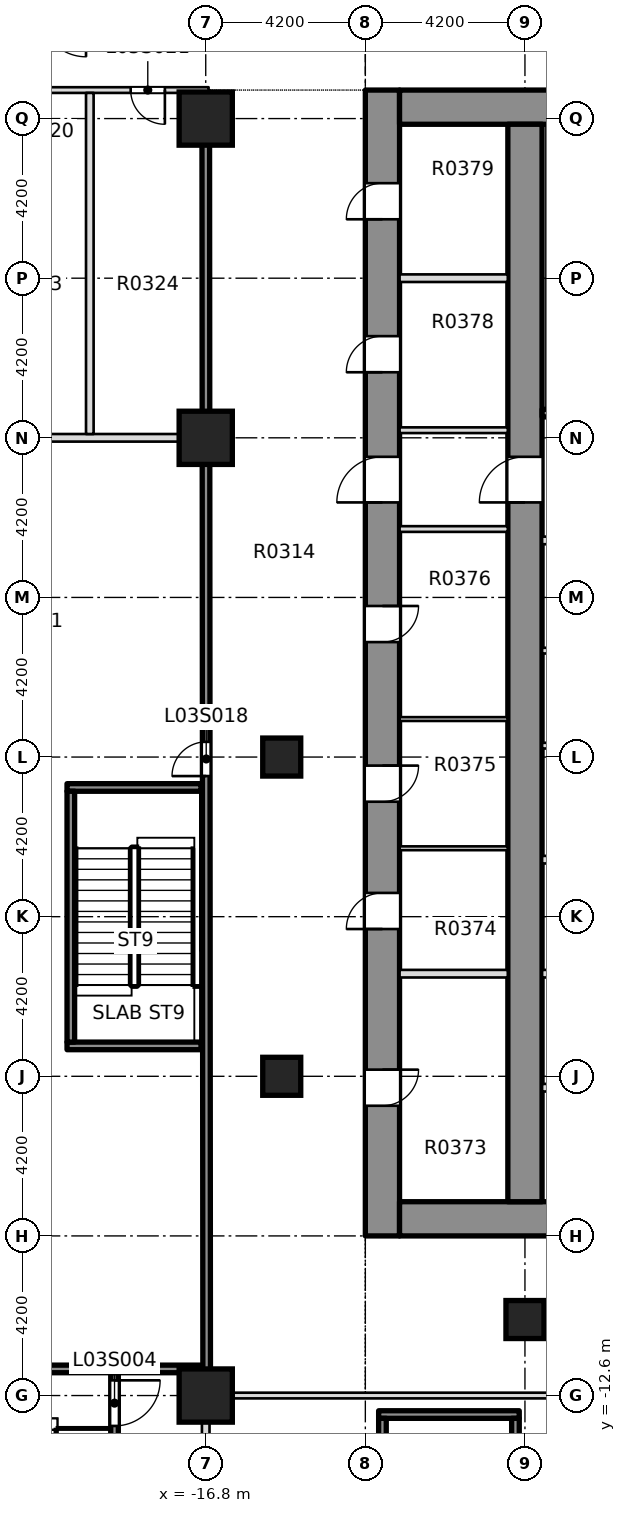
"""IFC4 building model, lengths in metres.
Left out: names, types, materials, properties, quantities, classifications, styles, units other than length and angle.
Written with IfcOpenShell. Run it as: python <this file> out.ifc"""

import sys

from ifc_helpers import new_model, si_unit, direction, frame, frame_2d, origin, origin_2d, place, context, subcontext, project, spatial, rectangle, extrude, element, fill, save


model = new_model("IFC4")
c1 = context("Model", 3, precision=1e-05, world=origin(), true_north=direction((0.0, 1.0)))
c2 = subcontext(c1, "Body", "Model", "MODEL_VIEW")
j1 = project(units=[si_unit("LENGTHUNIT", "METRE"), si_unit("PLANEANGLEUNIT", "RADIAN")], contexts=[c1])
p1 = place(None, origin())
s1 = spatial("IfcSite", under=j1, at=p1, CompositionType="ELEMENT")
p2 = place(p1, origin())
s2 = spatial("IfcBuilding", under=s1, at=p2, CompositionType="ELEMENT")
p3 = place(p2, frame((0.0, 0.0, 20.0)))
s3 = spatial("IfcBuildingStorey", under=s2, at=p3, CompositionType="ELEMENT", Elevation=20.0)
p4 = place(p3, frame((-12.15, -8.4, -0.4), z_axis=(0.0, 0.0, 1.0), x_axis=(0.0, 1.0, 0.0)))
e1 = element("IfcWall", 1, at=p4, inside=s3, PredefinedType="SHEAR", context=c2, shape_type="SweptSolid", body=[
    extrude(rectangle(XDim=30.15, YDim=0.9, at=frame_2d((15.075, 0.0))), origin(), (0.0, 0.0, 1.0), 5.0),
])
p5 = place(p4, frame((3.425, 0.0, 0.4)))
e2 = element("IfcOpeningElement", 2, at=p5, cuts=e1, PredefinedType="OPENING", context=c2, shape_type="SweptSolid", body=[
    extrude(rectangle(XDim=0.95, YDim=2.1, at=frame_2d((0.475, 1.05))), frame((0.0, 0.46, 0.0), z_axis=(0.0, -1.0, 0.0), x_axis=(1.0, 0.0, 0.0)), (0.0, 0.0, 1.0), 0.92),
])
p6 = place(p4, frame((8.075, 0.0, 0.4)))
e3 = element("IfcOpeningElement", 3, at=p6, cuts=e1, PredefinedType="OPENING", context=c2, shape_type="SweptSolid", body=[
    extrude(rectangle(XDim=0.95, YDim=2.1, at=frame_2d((0.475, 1.05))), frame((0.0, 0.46, 0.0), z_axis=(0.0, -1.0, 0.0), x_axis=(1.0, 0.0, 0.0)), (0.0, 0.0, 1.0), 0.92),
])
p7 = place(p4, frame((11.425, 0.0, 0.4)))
e4 = element("IfcOpeningElement", 4, at=p7, cuts=e1, PredefinedType="OPENING", context=c2, shape_type="SweptSolid", body=[
    extrude(rectangle(XDim=0.95, YDim=2.1, at=frame_2d((0.475, 1.05))), frame((0.0, 0.46, 0.0), z_axis=(0.0, -1.0, 0.0), x_axis=(1.0, 0.0, 0.0)), (0.0, 0.0, 1.0), 0.92),
])
p8 = place(p4, frame((15.625, 0.0, 0.4)))
e5 = element("IfcOpeningElement", 5, at=p8, cuts=e1, PredefinedType="OPENING", context=c2, shape_type="SweptSolid", body=[
    extrude(rectangle(XDim=0.95, YDim=2.1, at=frame_2d((0.475, 1.05))), frame((0.0, 0.46, 0.0), z_axis=(0.0, -1.0, 0.0), x_axis=(1.0, 0.0, 0.0)), (0.0, 0.0, 1.0), 0.92),
])
p9 = place(p4, frame((22.725, 0.0, 0.4)))
e6 = element("IfcOpeningElement", 6, at=p9, cuts=e1, PredefinedType="OPENING", context=c2, shape_type="SweptSolid", body=[
    extrude(rectangle(XDim=0.95, YDim=2.1, at=frame_2d((0.475, 1.05))), frame((0.0, 0.46, 0.0), z_axis=(0.0, -1.0, 0.0), x_axis=(1.0, 0.0, 0.0)), (0.0, 0.0, 1.0), 0.92),
])
p10 = place(p4, frame((26.75, 0.0, 0.4)))
e7 = element("IfcOpeningElement", 7, at=p10, cuts=e1, PredefinedType="OPENING", context=c2, shape_type="SweptSolid", body=[
    extrude(rectangle(XDim=0.95, YDim=2.1, at=frame_2d((0.475, 1.05))), frame((0.0, 0.46, 0.0), z_axis=(0.0, -1.0, 0.0), x_axis=(1.0, 0.0, 0.0)), (0.0, 0.0, 1.0), 0.92),
])
p11 = place(p4, frame((19.3, 0.0, 0.4)))
e8 = element("IfcOpeningElement", 8, at=p11, cuts=e1, PredefinedType="OPENING", context=c2, shape_type="SweptSolid", body=[
    extrude(rectangle(XDim=1.2, YDim=2.1, at=frame_2d((0.6, 1.05))), frame((0.0, 0.46, 0.0), z_axis=(0.0, -1.0, 0.0), x_axis=(1.0, 0.0, 0.0)), (0.0, 0.0, 1.0), 0.92),
])
p12 = place(p3, frame((-11.7, -7.95, -0.4), z_axis=(0.0, 0.0, 1.0), x_axis=(1.0, 0.0, 0.0)))
e9 = element("IfcWall", 9, at=p12, inside=s3, PredefinedType="SHEAR", context=c2, shape_type="SweptSolid", body=[
    extrude(rectangle(XDim=23.4, YDim=0.9, at=frame_2d((11.7, 0.0))), origin(), (0.0, 0.0, 1.0), 5.0),
])
p13 = place(p12, frame((6.95, 0.0, 0.4)))
e10 = element("IfcOpeningElement", 10, at=p13, cuts=e9, PredefinedType="OPENING", context=c2, shape_type="SweptSolid", body=[
    extrude(rectangle(XDim=1.8, YDim=2.1, at=frame_2d((0.9, 1.05))), frame((0.0, 0.46, 0.0), z_axis=(0.0, -1.0, 0.0), x_axis=(1.0, 0.0, 0.0)), (0.0, 0.0, 1.0), 0.92),
])
p14 = place(p12, frame((14.65, 0.0, 0.4)))
e11 = element("IfcOpeningElement", 11, at=p14, cuts=e9, PredefinedType="OPENING", context=c2, shape_type="SweptSolid", body=[
    extrude(rectangle(XDim=1.8, YDim=2.1, at=frame_2d((0.9, 1.05))), frame((0.0, 0.46, 0.0), z_axis=(0.0, -1.0, 0.0), x_axis=(1.0, 0.0, 0.0)), (0.0, 0.0, 1.0), 0.92),
])
p15 = place(p3, frame((-11.7, 21.3, -0.4), z_axis=(0.0, 0.0, 1.0), x_axis=(1.0, 0.0, 0.0)))
e12 = element("IfcWall", 12, at=p15, inside=s3, PredefinedType="SOLIDWALL", context=c2, shape_type="SweptSolid", body=[
    extrude(rectangle(XDim=23.4, YDim=0.9, at=frame_2d((11.7, 0.0))), origin(), (0.0, 0.0, 1.0), 5.0),
])
p16 = place(p3, frame((-8.4, -7.5, -0.4), z_axis=(0.0, 0.0, 1.0), x_axis=(0.0, 1.0, 0.0)))
e13 = element("IfcWall", 13, at=p16, inside=s3, PredefinedType="SHEAR", context=c2, shape_type="SweptSolid", body=[
    extrude(rectangle(XDim=28.35, YDim=0.9, at=frame_2d((14.175, 0.0))), origin(), (0.0, 0.0, 1.0), 5.0),
])
p17 = place(p16, frame((18.4, 0.0, 0.4)))
e14 = element("IfcOpeningElement", 14, at=p17, cuts=e13, PredefinedType="OPENING", context=c2, shape_type="SweptSolid", body=[
    extrude(rectangle(XDim=1.2, YDim=2.1, at=frame_2d((0.6, 1.05))), frame((0.0, 0.46, 0.0), z_axis=(0.0, -1.0, 0.0), x_axis=(1.0, 0.0, 0.0)), (0.0, 0.0, 1.0), 0.92),
])
for number, where, z_axis, x_axis in (
    (15, (-16.8, -12.6, -0.4), (0.0, 0.0, 1.0), (1.0, 0.0, 0.0)),
    (16, (-16.8, 12.6, -0.4), (0.0, 0.0, 1.0), (1.0, 0.0, 0.0)),
    (17, (-16.8, 21.0, -0.4), (0.0, 0.0, 1.0), (1.0, 0.0, 0.0)),
):
    element("IfcColumn", number, at=place(p3, frame(where, z_axis=z_axis, x_axis=x_axis)), inside=s3, PredefinedType="COLUMN", context=c2, shape_type="SweptSolid", body=[
        extrude(rectangle(XDim=1.4, YDim=1.4, at=origin_2d()), origin(), (0.0, 0.0, 1.0), 5.0),
    ])
for number, where, z_axis, x_axis in (
    (18, (-8.4, -10.6, -0.4), (0.0, 0.0, 1.0), (1.0, 0.0, 0.0)),
    (19, (-14.8, -4.2, -0.4), (0.0, 0.0, 1.0), (1.0, 0.0, 0.0)),
    (20, (-14.8, 4.2, -0.4), (0.0, 0.0, 1.0), (1.0, 0.0, 0.0)),
):
    element("IfcColumn", number, at=place(p3, frame(where, z_axis=z_axis, x_axis=x_axis)), inside=s3, PredefinedType="COLUMN", context=c2, shape_type="SweptSolid", body=[
        extrude(rectangle(XDim=1.0, YDim=1.0, at=origin_2d()), origin(), (0.0, 0.0, 1.0), 5.0),
    ])
p18 = place(p3, frame((-16.9, -12.6, 0.0), z_axis=(0.0, 0.0, 1.0), x_axis=(1.0, 0.0, 0.0)))
e21 = element("IfcWall", 21, at=p18, inside=s3, PredefinedType="PARTITIONING", context=c2, shape_type="SweptSolid", body=[
    extrude(rectangle(XDim=9.625, YDim=0.15, at=frame_2d((4.812, 0.0))), origin(), (0.0, 0.0, 1.0), 4.6),
])
p19 = place(p3, frame((-25.2, -11.9, 0.0), z_axis=(0.0, 0.0, 1.0), x_axis=(1.0, 0.0, 0.0)))
e22 = element("IfcWall", 22, at=p19, inside=s3, PredefinedType="SOLIDWALL", context=c2, shape_type="SweptSolid", body=[
    extrude(rectangle(XDim=8.325, YDim=0.2, at=frame_2d((4.163, 0.0))), origin(), (0.0, 0.0, 1.0), 4.6),
])
p20 = place(p3, frame((-25.75, 12.6, 0.0), z_axis=(0.0, 0.0, 1.0), x_axis=(1.0, 0.0, 0.0)))
e23 = element("IfcWall", 23, at=p20, inside=s3, PredefinedType="PARTITIONING", context=c2, shape_type="SweptSolid", body=[
    extrude(rectangle(XDim=8.875, YDim=0.2, at=frame_2d((4.438, 0.0))), origin(), (0.0, 0.0, 1.0), 4.6),
])
p21 = place(p3, frame((-25.75, 21.75, 0.0), z_axis=(0.0, 0.0, 1.0), x_axis=(1.0, 0.0, 0.0)))
e24 = element("IfcWall", 24, at=p21, inside=s3, PredefinedType="PARTITIONING", context=c2, shape_type="SweptSolid", body=[
    extrude(rectangle(XDim=9.025, YDim=0.15, at=frame_2d((4.512, 0.0))), origin(), (0.0, 0.0, 1.0), 4.6),
])
p22 = place(p21, frame((1.225, 0.0, 0.0)))
e25 = element("IfcOpeningElement", 25, at=p22, cuts=e24, PredefinedType="OPENING", context=c2, shape_type="SweptSolid", body=[
    extrude(rectangle(XDim=0.9, YDim=2.1, at=frame_2d((0.45, 1.05))), frame((0.0, 0.085, 0.0), z_axis=(0.0, -1.0, 0.0), x_axis=(1.0, 0.0, 0.0)), (0.0, 0.0, 1.0), 0.17),
])
p23 = place(p21, frame((3.925, 0.0, 0.0)))
e26 = element("IfcOpeningElement", 26, at=p23, cuts=e24, PredefinedType="OPENING", context=c2, shape_type="SweptSolid", body=[
    extrude(rectangle(XDim=0.9, YDim=2.1, at=frame_2d((0.45, 1.05))), frame((0.0, 0.085, 0.0), z_axis=(0.0, -1.0, 0.0), x_axis=(1.0, 0.0, 0.0)), (0.0, 0.0, 1.0), 0.17),
])
p24 = place(p21, frame((6.975, 0.0, 0.0)))
e27 = element("IfcOpeningElement", 27, at=p24, cuts=e24, PredefinedType="OPENING", context=c2, shape_type="SweptSolid", body=[
    extrude(rectangle(XDim=0.9, YDim=2.1, at=frame_2d((0.45, 1.05))), frame((0.0, 0.085, 0.0), z_axis=(0.0, -1.0, 0.0), x_axis=(1.0, 0.0, 0.0)), (0.0, 0.0, 1.0), 0.17),
])
p25 = place(p3, frame((-19.85, 12.7, 0.0), z_axis=(0.0, 0.0, 1.0), x_axis=(0.0, 1.0, 0.0)))
e28 = element("IfcWall", 28, at=p25, inside=s3, PredefinedType="PARTITIONING", context=c2, shape_type="SweptSolid", body=[
    extrude(rectangle(XDim=8.975, YDim=0.2, at=frame_2d((4.488, 0.0))), origin(), (0.0, 0.0, 1.0), 4.6),
])
p26 = place(p3, frame((-19.2, -18.125, 0.0), z_axis=(0.0, 0.0, 1.0), x_axis=(0.0, 1.0, 0.0)))
e29 = element("IfcWall", 29, at=p26, inside=s3, PredefinedType="SOLIDWALL", context=c2, shape_type="SweptSolid", body=[
    extrude(rectangle(XDim=6.125, YDim=0.2, at=frame_2d((3.062, 0.0))), origin(), (0.0, 0.0, 1.0), 4.6),
])
p27 = place(p26, frame((4.725, 0.0, 0.0)))
e30 = element("IfcOpeningElement", 30, at=p27, cuts=e29, PredefinedType="OPENING", context=c2, shape_type="SweptSolid", body=[
    extrude(rectangle(XDim=1.2, YDim=2.1, at=frame_2d((0.6, 1.05))), frame((0.0, 0.11, 0.0), z_axis=(0.0, -1.0, 0.0), x_axis=(1.0, 0.0, 0.0)), (0.0, 0.0, 1.0), 0.22),
])
p28 = place(p3, frame((-16.8, -18.125, 0.0), z_axis=(0.0, 0.0, 1.0), x_axis=(0.0, 1.0, 0.0)))
e31 = element("IfcWall", 31, at=p28, inside=s3, PredefinedType="PARTITIONING", context=c2, shape_type="SweptSolid", body=[
    extrude(rectangle(XDim=5.45, YDim=0.2, at=frame_2d((2.725, 0.0))), origin(), (0.0, 0.0, 1.0), 4.6),
])
p29 = place(p3, frame((-16.775, -12.525, 0.0), z_axis=(0.0, 0.0, 1.0), x_axis=(-0.000727609751, 0.999999735292, 0.0)))
e32 = element("IfcWall", 32, at=p29, inside=s3, PredefinedType="SOLIDWALL", context=c2, shape_type="SweptSolid", body=[
    extrude(rectangle(XDim=34.225, YDim=0.2, at=frame_2d((17.112, 0.0))), origin(), (0.0, 0.0, 1.0), 4.6),
])
p30 = place(p29, frame((16.225, 0.0, 0.0)))
e33 = element("IfcOpeningElement", 33, at=p30, cuts=e32, PredefinedType="OPENING", context=c2, shape_type="SweptSolid", body=[
    extrude(rectangle(XDim=0.9, YDim=2.1, at=frame_2d((0.45, 1.05))), frame((0.0, 0.11, 0.0), z_axis=(0.0, -1.0, 0.0), x_axis=(1.0, 0.0, 0.0)), (0.0, 0.0, 1.0), 0.22),
])
for number, where, z_axis, x_axis in (
    (34, (-7.949, -4.5, 0.0), (0.0, 0.0, 1.0), (1.0, 0.0, 0.0)),
    (35, (-7.949, -1.5, 0.0), (0.0, 0.0, 1.0), (1.0, 0.0, 0.0)),
    (36, (-7.949, 1.5, 0.0), (0.0, 0.0, 1.0), (1.0, 0.0, 0.0)),
):
    element("IfcWall", number, at=place(p3, frame(where, z_axis=z_axis, x_axis=x_axis)), inside=s3, PredefinedType="PARTITIONING", context=c2, shape_type="SweptSolid", body=[
        extrude(rectangle(XDim=2.374, YDim=0.2, at=frame_2d((1.187, 0.0))), origin(), (0.0, 0.0, 1.0), 4.6),
    ])
p31 = place(p3, frame((-7.949, 4.5, 0.0), z_axis=(0.0, 0.0, 1.0), x_axis=(1.0, 0.0, 0.0)))
e37 = element("IfcWall", 37, at=p31, inside=s3, PredefinedType="PARTITIONING", context=c2, shape_type="SweptSolid", body=[
    extrude(rectangle(XDim=2.524, YDim=0.15, at=frame_2d((1.262, 0.0))), origin(), (0.0, 0.0, 1.0), 4.6),
])
p32 = place(p3, frame((-7.949, 7.0, 0.0), z_axis=(0.0, 0.0, 1.0), x_axis=(1.0, 0.0, 0.0)))
e38 = element("IfcWall", 38, at=p32, inside=s3, PredefinedType="PARTITIONING", context=c2, shape_type="SweptSolid", body=[
    extrude(rectangle(XDim=15.898, YDim=0.15, at=frame_2d((7.949, 0.0))), origin(), (0.0, 0.0, 1.0), 4.6),
])
p33 = place(p32, frame((7.249, 0.0, 0.0)))
e39 = element("IfcOpeningElement", 39, at=p33, cuts=e38, PredefinedType="OPENING", context=c2, shape_type="SweptSolid", body=[
    extrude(rectangle(XDim=1.4, YDim=2.1, at=frame_2d((0.7, 1.05))), frame((0.0, 0.085, 0.0), z_axis=(0.0, -1.0, 0.0), x_axis=(1.0, 0.0, 0.0)), (0.0, 0.0, 1.0), 0.17),
])
p34 = place(p3, frame((-7.949, 9.9, 0.0), z_axis=(0.0, 0.0, 1.0), x_axis=(1.0, 0.0, 0.0)))
e40 = element("IfcWall", 40, at=p34, inside=s3, PredefinedType="PARTITIONING", context=c2, shape_type="SweptSolid", body=[
    extrude(rectangle(XDim=4.349, YDim=0.2, at=frame_2d((2.174, 0.0))), origin(), (0.0, 0.0, 1.0), 4.6),
])
p35 = place(p34, frame((0.999, 0.0, 0.0)))
e41 = element("IfcOpeningElement", 41, at=p35, cuts=e40, PredefinedType="OPENING", context=c2, shape_type="SweptSolid", body=[
    extrude(rectangle(XDim=1.1, YDim=2.1, at=frame_2d((0.55, 1.05))), frame((0.0, 0.11, 0.0), z_axis=(0.0, -1.0, 0.0), x_axis=(1.0, 0.0, 0.0)), (0.0, 0.0, 1.0), 0.22),
])
p36 = place(p3, frame((-7.949, 13.25, 0.0), z_axis=(0.0, 0.0, 1.0), x_axis=(1.0, 0.0, 0.0)))
e42 = element("IfcWall", 42, at=p36, inside=s3, PredefinedType="SOLIDWALL", context=c2, shape_type="SweptSolid", body=[
    extrude(rectangle(XDim=4.524, YDim=0.2, at=frame_2d((2.262, 0.0))), origin(), (0.0, 0.0, 1.0), 4.6),
])
p37 = place(p36, frame((1.499, 0.0, 0.0)))
e43 = element("IfcOpeningElement", 43, at=p37, cuts=e42, PredefinedType="OPENING", context=c2, shape_type="SweptSolid", body=[
    extrude(rectangle(XDim=1.2, YDim=2.1, at=frame_2d((0.6, 1.05))), frame((0.0, 0.11, 0.0), z_axis=(0.0, -1.0, 0.0), x_axis=(1.0, 0.0, 0.0)), (0.0, 0.0, 1.0), 0.22),
])
p38 = place(p3, frame((-11.699, -1.5, 0.0), z_axis=(0.0, 0.0, 1.0), x_axis=(1.0, 0.0, 0.0)))
e44 = element("IfcWall", 44, at=p38, inside=s3, PredefinedType="PARTITIONING", context=c2, shape_type="SweptSolid", body=[
    extrude(rectangle(XDim=2.848, YDim=0.2, at=frame_2d((1.424, 0.0))), origin(), (0.0, 0.0, 1.0), 4.6),
])
for number, where, z_axis, x_axis in (
    (45, (-11.699, 1.8, 0.0), (0.0, 0.0, 1.0), (1.0, 0.0, 0.0)),
    (46, (-11.699, 5.2, 0.0), (0.0, 0.0, 1.0), (1.0, 0.0, 0.0)),
):
    element("IfcWall", number, at=place(p3, frame(where, z_axis=z_axis, x_axis=x_axis)), inside=s3, PredefinedType="PARTITIONING", context=c2, shape_type="SweptSolid", body=[
        extrude(rectangle(XDim=2.848, YDim=0.1, at=frame_2d((1.424, 0.0))), origin(), (0.0, 0.0, 1.0), 4.6),
    ])
for number, where, z_axis, x_axis in (
    (47, (-11.699, 10.2, 0.0), (0.0, 0.0, 1.0), (1.0, 0.0, 0.0)),
    (48, (-11.699, 12.8, 0.0), (0.0, 0.0, 1.0), (1.0, 0.0, 0.0)),
):
    element("IfcWall", number, at=place(p3, frame(where, z_axis=z_axis, x_axis=x_axis)), inside=s3, PredefinedType="PARTITIONING", context=c2, shape_type="SweptSolid", body=[
        extrude(rectangle(XDim=2.848, YDim=0.15, at=frame_2d((1.424, 0.0))), origin(), (0.0, 0.0, 1.0), 4.6),
    ])
p39 = place(p3, frame((-11.699, 16.8, 0.0), z_axis=(0.0, 0.0, 1.0), x_axis=(1.0, 0.0, 0.0)))
e49 = element("IfcWall", 49, at=p39, inside=s3, PredefinedType="PARTITIONING", context=c2, shape_type="SweptSolid", body=[
    extrude(rectangle(XDim=2.848, YDim=0.2, at=frame_2d((1.424, 0.0))), origin(), (0.0, 0.0, 1.0), 4.6),
])
p40 = place(p3, frame((-12.25, -13.1, 0.0), z_axis=(0.0, 0.0, 1.0), x_axis=(1.0, 0.0, 0.0)))
e50 = element("IfcWall", 50, at=p40, inside=s3, PredefinedType="SOLIDWALL", context=c2, shape_type="SweptSolid", body=[
    extrude(rectangle(XDim=3.7, YDim=0.2, at=frame_2d((1.85, 0.0))), origin(), (0.0, 0.0, 1.0), 4.6),
])
p41 = place(p3, frame((-12.15, -19.8, 0.0), z_axis=(0.0, 0.0, 1.0), x_axis=(0.0, 1.0, 0.0)))
e51 = element("IfcWall", 51, at=p41, inside=s3, PredefinedType="SOLIDWALL", context=c2, shape_type="SweptSolid", body=[
    extrude(rectangle(XDim=6.6, YDim=0.2, at=frame_2d((3.3, 0.0))), origin(), (0.0, 0.0, 1.0), 4.6),
])
p42 = place(p3, frame((-8.65, -20.3, 0.0), z_axis=(0.0, 0.0, 1.0), x_axis=(0.0, 1.0, 0.0)))
e52 = element("IfcWall", 52, at=p42, inside=s3, PredefinedType="SOLIDWALL", context=c2, shape_type="SweptSolid", body=[
    extrude(rectangle(XDim=7.1, YDim=0.2, at=frame_2d((3.55, 0.0))), origin(), (0.0, 0.0, 1.0), 4.6),
])
for number, where, z_axis, x_axis in (
    (53, (-20.45, -3.4, 0.0), (0.0, 0.0, 1.0), (1.0, 0.0, 0.0)),
    (54, (-20.45, 3.4, 0.0), (0.0, 0.0, 1.0), (1.0, 0.0, 0.0)),
):
    element("IfcWall", number, at=place(p3, frame(where, z_axis=z_axis, x_axis=x_axis)), inside=s3, PredefinedType="SOLIDWALL", context=c2, shape_type="SweptSolid", body=[
        extrude(rectangle(XDim=3.525, YDim=0.2, at=frame_2d((1.762, 0.0))), origin(), (0.0, 0.0, 1.0), 4.6),
    ])
p43 = place(p3, frame((-20.35, -3.3, 0.0), z_axis=(0.0, 0.0, 1.0), x_axis=(0.0, 1.0, 0.0)))
e55 = element("IfcWall", 55, at=p43, inside=s3, PredefinedType="SOLIDWALL", context=c2, shape_type="SweptSolid", body=[
    extrude(rectangle(XDim=6.6, YDim=0.2, at=frame_2d((3.3, 0.0))), origin(), (0.0, 0.0, 1.0), 4.6),
])
p44 = place(p27, origin())
e56 = element("IfcDoor", 56, at=p44, inside=s3, OperationType="DOUBLE_DOOR_SINGLE_SWING", PredefinedType="DOOR", context=c2, shape_type="SweptSolid", body=[
    extrude(rectangle(XDim=1.2, YDim=2.1, at=frame_2d((0.6, 1.05))), frame((0.0, 0.025, 0.0), z_axis=(0.0, -1.0, 0.0), x_axis=(1.0, 0.0, 0.0)), (0.0, 0.0, 1.0), 0.05),
])
fill(e30, e56)
p45 = place(p30, origin())
e57 = element("IfcDoor", 57, at=p45, inside=s3, OperationType="SINGLE_SWING_LEFT", PredefinedType="DOOR", context=c2, shape_type="SweptSolid", body=[
    extrude(rectangle(XDim=0.9, YDim=2.1, at=frame_2d((0.45, 1.05))), frame((0.0, 0.025, 0.0), z_axis=(0.0, -1.0, 0.0), x_axis=(1.0, 0.0, 0.0)), (0.0, 0.0, 1.0), 0.05),
])
fill(e33, e57)
p46 = place(p24, origin())
e58 = element("IfcDoor", 58, at=p46, inside=s3, OperationType="SINGLE_SWING_RIGHT", PredefinedType="DOOR", context=c2, shape_type="SweptSolid", body=[
    extrude(rectangle(XDim=0.9, YDim=2.1, at=frame_2d((0.45, 1.05))), frame((0.0, 0.025, 0.0), z_axis=(0.0, -1.0, 0.0), x_axis=(1.0, 0.0, 0.0)), (0.0, 0.0, 1.0), 0.05),
])
fill(e27, e58)
p47 = place(p5, origin())
e59 = element("IfcDoor", 59, at=p47, inside=s3, OperationType="SINGLE_SWING_LEFT", PredefinedType="DOOR", context=c2, shape_type="SweptSolid", body=[
    extrude(rectangle(XDim=0.95, YDim=2.1, at=frame_2d((0.475, 1.05))), frame((0.0, 0.025, 0.0), z_axis=(0.0, -1.0, 0.0), x_axis=(1.0, 0.0, 0.0)), (0.0, 0.0, 1.0), 0.05),
])
fill(e2, e59)
p48 = place(p6, origin())
e60 = element("IfcDoor", 60, at=p48, inside=s3, OperationType="SINGLE_SWING_LEFT", PredefinedType="DOOR", context=c2, shape_type="SweptSolid", body=[
    extrude(rectangle(XDim=0.95, YDim=2.1, at=frame_2d((0.475, 1.05))), frame((0.0, 0.025, 0.0), z_axis=(0.0, -1.0, 0.0), x_axis=(1.0, 0.0, 0.0)), (0.0, 0.0, 1.0), 0.05),
])
fill(e3, e60)
p49 = place(p7, origin())
e61 = element("IfcDoor", 61, at=p49, inside=s3, OperationType="SINGLE_SWING_LEFT", PredefinedType="DOOR", context=c2, shape_type="SweptSolid", body=[
    extrude(rectangle(XDim=0.95, YDim=2.1, at=frame_2d((0.475, 1.05))), frame((0.0, 0.025, 0.0), z_axis=(0.0, -1.0, 0.0), x_axis=(1.0, 0.0, 0.0)), (0.0, 0.0, 1.0), 0.05),
])
fill(e4, e61)
p50 = place(p8, origin())
e62 = element("IfcDoor", 62, at=p50, inside=s3, OperationType="SINGLE_SWING_LEFT", PredefinedType="DOOR", context=c2, shape_type="SweptSolid", body=[
    extrude(rectangle(XDim=0.95, YDim=2.1, at=frame_2d((0.475, 1.05))), frame((0.0, 0.025, 0.0), z_axis=(0.0, -1.0, 0.0), x_axis=(1.0, 0.0, 0.0)), (0.0, 0.0, 1.0), 0.05),
])
fill(e5, e62)
p51 = place(p9, origin())
e63 = element("IfcDoor", 63, at=p51, inside=s3, OperationType="SINGLE_SWING_LEFT", PredefinedType="DOOR", context=c2, shape_type="SweptSolid", body=[
    extrude(rectangle(XDim=0.95, YDim=2.1, at=frame_2d((0.475, 1.05))), frame((0.0, 0.025, 0.0), z_axis=(0.0, -1.0, 0.0), x_axis=(1.0, 0.0, 0.0)), (0.0, 0.0, 1.0), 0.05),
])
fill(e6, e63)
p52 = place(p10, origin())
e64 = element("IfcDoor", 64, at=p52, inside=s3, OperationType="SINGLE_SWING_LEFT", PredefinedType="DOOR", context=c2, shape_type="SweptSolid", body=[
    extrude(rectangle(XDim=0.95, YDim=2.1, at=frame_2d((0.475, 1.05))), frame((0.0, 0.025, 0.0), z_axis=(0.0, -1.0, 0.0), x_axis=(1.0, 0.0, 0.0)), (0.0, 0.0, 1.0), 0.05),
])
fill(e7, e64)
p53 = place(p11, origin())
e65 = element("IfcDoor", 65, at=p53, inside=s3, OperationType="SINGLE_SWING_LEFT", PredefinedType="DOOR", context=c2, shape_type="SweptSolid", body=[
    extrude(rectangle(XDim=1.2, YDim=2.1, at=frame_2d((0.6, 1.05))), frame((0.0, 0.025, 0.0), z_axis=(0.0, -1.0, 0.0), x_axis=(1.0, 0.0, 0.0)), (0.0, 0.0, 1.0), 0.05),
])
fill(e8, e65)
p54 = place(p17, origin())
e66 = element("IfcDoor", 66, at=p54, inside=s3, OperationType="SINGLE_SWING_LEFT", PredefinedType="DOOR", context=c2, shape_type="SweptSolid", body=[
    extrude(rectangle(XDim=1.2, YDim=2.1, at=frame_2d((0.6, 1.05))), frame((0.0, 0.025, 0.0), z_axis=(0.0, -1.0, 0.0), x_axis=(1.0, 0.0, 0.0)), (0.0, 0.0, 1.0), 0.05),
])
fill(e14, e66)
save(model, sys.argv[1])
